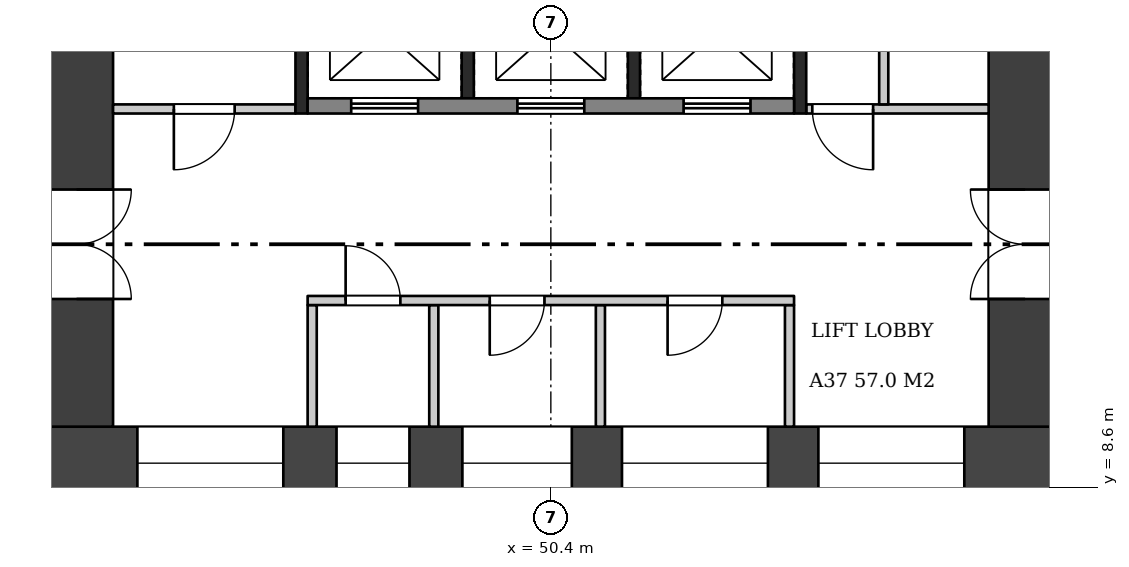
"""IFC4 building model, lengths in metres.
Left out: names, types, materials, properties, quantities, classifications, styles, units other than length and angle.
Written with IfcOpenShell. Run it as: python <this file> out.ifc"""

import sys

from ifc_helpers import new_model, si_unit, direction, frame, frame_2d, origin, place, context, subcontext, project, spatial, rectangle, extrude, element, fill, save


model = new_model("IFC4")
c1 = context("Model", 3, precision=1e-05, world=origin(), true_north=direction((0.0, 1.0)))
c2 = subcontext(c1, "Body", "Model", "MODEL_VIEW")
j1 = project(units=[si_unit("LENGTHUNIT", "METRE"), si_unit("PLANEANGLEUNIT", "RADIAN")], contexts=[c1])
p1 = place(None, origin())
s1 = spatial("IfcSite", under=j1, at=p1, CompositionType="ELEMENT")
p2 = place(p1, origin())
s2 = spatial("IfcBuilding", under=s1, at=p2, CompositionType="ELEMENT")
p3 = place(p2, frame((0.0, 0.0, 147.7)))
s3 = spatial("IfcBuildingStorey", under=s2, at=p3, CompositionType="ELEMENT", Elevation=147.7)
p4 = place(p3, frame((42.0, 9.0, 0.0), z_axis=(0.0, 0.0, 1.0), x_axis=(1.0, 0.0, 0.0)))
e1 = element("IfcWall", 1, at=p4, inside=s3, PredefinedType="SHEAR", context=c2, shape_type="SweptSolid", body=[
    extrude(rectangle(XDim=16.8, YDim=1.2, at=frame_2d((8.4, 0.0))), origin(), (0.0, 0.0, 1.0), 3.22),
])
p5 = place(p4, frame((1.6, 0.0, 0.6)))
e2 = element("IfcOpeningElement", 2, at=p5, cuts=e1, PredefinedType="OPENING", context=c2, shape_type="SweptSolid", body=[
    extrude(rectangle(XDim=2.4, YDim=2.1, at=frame_2d((1.2, 1.05))), frame((0.0, 0.61, 0.0), z_axis=(0.0, -1.0, 0.0), x_axis=(1.0, 0.0, 0.0)), (0.0, 0.0, 1.0), 1.22),
])
p6 = place(p4, frame((4.875, 0.0, 1.6)))
e3 = element("IfcOpeningElement", 3, at=p6, cuts=e1, PredefinedType="OPENING", context=c2, shape_type="SweptSolid", body=[
    extrude(rectangle(XDim=1.2, YDim=1.2, at=frame_2d((0.6, 0.6))), frame((0.0, 0.61, 0.0), z_axis=(0.0, -1.0, 0.0), x_axis=(1.0, 0.0, 0.0)), (0.0, 0.0, 1.0), 1.22),
])
p7 = place(p4, frame((6.945, 0.0, 1.6)))
e4 = element("IfcOpeningElement", 4, at=p7, cuts=e1, PredefinedType="OPENING", context=c2, shape_type="SweptSolid", body=[
    extrude(rectangle(XDim=1.8, YDim=1.2, at=frame_2d((0.9, 0.6))), frame((0.0, 0.61, 0.0), z_axis=(0.0, -1.0, 0.0), x_axis=(1.0, 0.0, 0.0)), (0.0, 0.0, 1.0), 1.22),
])
p8 = place(p4, frame((9.57, 0.0, 1.6)))
e5 = element("IfcOpeningElement", 5, at=p8, cuts=e1, PredefinedType="OPENING", context=c2, shape_type="SweptSolid", body=[
    extrude(rectangle(XDim=2.4, YDim=1.2, at=frame_2d((1.2, 0.6))), frame((0.0, 0.61, 0.0), z_axis=(0.0, -1.0, 0.0), x_axis=(1.0, 0.0, 0.0)), (0.0, 0.0, 1.0), 1.22),
])
p9 = place(p4, frame((12.8, 0.0, 0.6)))
e6 = element("IfcOpeningElement", 6, at=p9, cuts=e1, PredefinedType="OPENING", context=c2, shape_type="SweptSolid", body=[
    extrude(rectangle(XDim=2.4, YDim=2.1, at=frame_2d((1.2, 1.05))), frame((0.0, 0.61, 0.0), z_axis=(0.0, -1.0, 0.0), x_axis=(1.0, 0.0, 0.0)), (0.0, 0.0, 1.0), 1.22),
])
p10 = place(p3, frame((42.6, 9.6, 0.0), z_axis=(0.0, 0.0, 1.0), x_axis=(0.0, 1.0, 0.0)))
e7 = element("IfcWall", 7, at=p10, inside=s3, PredefinedType="SHEAR", context=c2, shape_type="SweptSolid", body=[
    extrude(rectangle(XDim=14.4, YDim=1.2, at=frame_2d((7.2, 0.0))), origin(), (0.0, 0.0, 1.0), 3.22),
])
p11 = place(p10, frame((2.1, 0.0, 0.0)))
e8 = element("IfcOpeningElement", 8, at=p11, cuts=e7, PredefinedType="OPENING", context=c2, shape_type="SweptSolid", body=[
    extrude(rectangle(XDim=1.8, YDim=2.1, at=frame_2d((0.9, 1.05))), frame((0.0, 0.61, 0.0), z_axis=(0.0, -1.0, 0.0), x_axis=(1.0, 0.0, 0.0)), (0.0, 0.0, 1.0), 1.22),
])
p12 = place(p3, frame((58.2, 9.6, 0.0), z_axis=(0.0, 0.0, 1.0), x_axis=(0.0, 1.0, 0.0)))
e9 = element("IfcWall", 9, at=p12, inside=s3, PredefinedType="SHEAR", context=c2, shape_type="SweptSolid", body=[
    extrude(rectangle(XDim=14.4, YDim=1.2, at=frame_2d((7.2, 0.0))), origin(), (0.0, 0.0, 1.0), 3.22),
])
p13 = place(p12, frame((2.1, 0.0, 0.0)))
e10 = element("IfcOpeningElement", 10, at=p13, cuts=e9, PredefinedType="OPENING", context=c2, shape_type="SweptSolid", body=[
    extrude(rectangle(XDim=1.8, YDim=2.1, at=frame_2d((0.9, 1.05))), frame((0.0, 0.61, 0.0), z_axis=(0.0, -1.0, 0.0), x_axis=(1.0, 0.0, 0.0)), (0.0, 0.0, 1.0), 1.22),
])
for number, where, z_axis, x_axis in (
    (11, (46.475, 9.6, 0.0), (0.0, 0.0, 1.0), (0.0, 1.0, 0.0)),
    (12, (54.325, 9.6, 0.0), (0.0, 0.0, 1.0), (0.0, 1.0, 0.0)),
    (13, (48.475, 9.6, 0.0), (0.0, 0.0, 1.0), (0.0, 1.0, 0.0)),
    (14, (51.215, 9.6, 0.0), (0.0, 0.0, 1.0), (0.0, 1.0, 0.0)),
):
    element("IfcWall", number, at=place(p3, frame(where, z_axis=z_axis, x_axis=x_axis)), inside=s3, PredefinedType="PARTITIONING", context=c2, shape_type="SweptSolid", body=[
        extrude(rectangle(XDim=2.0, YDim=0.15, at=frame_2d((1.0, 0.0))), origin(), (0.0, 0.0, 1.0), 3.22),
    ])
p14 = place(p3, frame((46.4, 11.675, 0.0), z_axis=(0.0, 0.0, 1.0), x_axis=(1.0, 0.0, 0.0)))
e15 = element("IfcWall", 15, at=p14, inside=s3, PredefinedType="PARTITIONING", context=c2, shape_type="SweptSolid", body=[
    extrude(rectangle(XDim=8.0, YDim=0.15, at=frame_2d((4.0, 0.0))), origin(), (0.0, 0.0, 1.0), 3.22),
])
p15 = place(p14, frame((0.625, 0.0, 0.0)))
e16 = element("IfcOpeningElement", 16, at=p15, cuts=e15, PredefinedType="OPENING", context=c2, shape_type="SweptSolid", body=[
    extrude(rectangle(XDim=0.9, YDim=2.1, at=frame_2d((0.45, 1.05))), frame((0.0, 0.085, 0.0), z_axis=(0.0, -1.0, 0.0), x_axis=(1.0, 0.0, 0.0)), (0.0, 0.0, 1.0), 0.17),
])
p16 = place(p14, frame((2.995, 0.0, 0.0)))
e17 = element("IfcOpeningElement", 17, at=p16, cuts=e15, PredefinedType="OPENING", context=c2, shape_type="SweptSolid", body=[
    extrude(rectangle(XDim=0.9, YDim=2.1, at=frame_2d((0.45, 1.05))), frame((0.0, 0.085, 0.0), z_axis=(0.0, -1.0, 0.0), x_axis=(1.0, 0.0, 0.0)), (0.0, 0.0, 1.0), 0.17),
])
p17 = place(p14, frame((5.92, 0.0, 0.0)))
e18 = element("IfcOpeningElement", 18, at=p17, cuts=e15, PredefinedType="OPENING", context=c2, shape_type="SweptSolid", body=[
    extrude(rectangle(XDim=0.9, YDim=2.1, at=frame_2d((0.45, 1.05))), frame((0.0, 0.085, 0.0), z_axis=(0.0, -1.0, 0.0), x_axis=(1.0, 0.0, 0.0)), (0.0, 0.0, 1.0), 0.17),
])
for number, where, z_axis, x_axis in (
    (19, (49.033, 15.0, 0.0), (0.0, 0.0, 1.0), (0.0, 1.0, 0.0)),
    (20, (51.767, 15.0, 0.0), (0.0, 0.0, 1.0), (0.0, 1.0, 0.0)),
):
    element("IfcWall", number, at=place(p3, frame(where, z_axis=z_axis, x_axis=x_axis)), inside=s3, PredefinedType="SHEAR", context=c2, shape_type="SweptSolid", body=[
        extrude(rectangle(XDim=1.9, YDim=0.2, at=frame_2d((0.95, 0.0))), origin(), (0.0, 0.0, 1.0), 3.22),
    ])
p18 = place(p3, frame((46.4, 14.875, 0.0), z_axis=(0.0, 0.0, 1.0), x_axis=(1.0, 0.0, 0.0)))
e21 = element("IfcWall", 21, at=p18, inside=s3, PredefinedType="SHEAR", context=c2, shape_type="SweptSolid", body=[
    extrude(rectangle(XDim=8.0, YDim=0.25, at=frame_2d((4.0, 0.0))), origin(), (0.0, 0.0, 1.0), 3.22),
])
p19 = place(p18, frame((0.717, 0.0, 0.0)))
e22 = element("IfcOpeningElement", 22, at=p19, cuts=e21, PredefinedType="OPENING", context=c2, shape_type="SweptSolid", body=[
    extrude(rectangle(XDim=1.1, YDim=2.1, at=frame_2d((0.55, 1.05))), frame((0.0, 0.135, 0.0), z_axis=(0.0, -1.0, 0.0), x_axis=(1.0, 0.0, 0.0)), (0.0, 0.0, 1.0), 0.27),
])
p20 = place(p18, frame((3.45, 0.0, 0.0)))
e23 = element("IfcOpeningElement", 23, at=p20, cuts=e21, PredefinedType="OPENING", context=c2, shape_type="SweptSolid", body=[
    extrude(rectangle(XDim=1.1, YDim=2.1, at=frame_2d((0.55, 1.05))), frame((0.0, 0.135, 0.0), z_axis=(0.0, -1.0, 0.0), x_axis=(1.0, 0.0, 0.0)), (0.0, 0.0, 1.0), 0.27),
])
p21 = place(p18, frame((6.183, 0.0, 0.0)))
e24 = element("IfcOpeningElement", 24, at=p21, cuts=e21, PredefinedType="OPENING", context=c2, shape_type="SweptSolid", body=[
    extrude(rectangle(XDim=1.1, YDim=2.1, at=frame_2d((0.55, 1.05))), frame((0.0, 0.135, 0.0), z_axis=(0.0, -1.0, 0.0), x_axis=(1.0, 0.0, 0.0)), (0.0, 0.0, 1.0), 0.27),
])
p22 = place(p3, frame((46.3, 14.75, 0.0), z_axis=(0.0, 0.0, 1.0), x_axis=(0.0, 1.0, 0.0)))
e25 = element("IfcWall", 25, at=p22, inside=s3, PredefinedType="SHEAR", context=c2, shape_type="SweptSolid", body=[
    extrude(rectangle(XDim=2.4, YDim=0.2, at=frame_2d((1.2, 0.0))), origin(), (0.0, 0.0, 1.0), 3.22),
])
p23 = place(p3, frame((43.2, 14.825, 0.0), z_axis=(0.0, 0.0, 1.0), x_axis=(1.0, 0.0, 0.0)))
e26 = element("IfcWall", 26, at=p23, inside=s3, PredefinedType="PARTITIONING", context=c2, shape_type="SweptSolid", body=[
    extrude(rectangle(XDim=3.0, YDim=0.15, at=frame_2d((1.5, 0.0))), origin(), (0.0, 0.0, 1.0), 3.22),
])
p24 = place(p23, frame((1.0, 0.0, 0.0)))
e27 = element("IfcOpeningElement", 27, at=p24, cuts=e26, PredefinedType="OPENING", context=c2, shape_type="SweptSolid", body=[
    extrude(rectangle(XDim=1.0, YDim=2.1, at=frame_2d((0.5, 1.05))), frame((0.0, 0.085, 0.0), z_axis=(0.0, -1.0, 0.0), x_axis=(1.0, 0.0, 0.0)), (0.0, 0.0, 1.0), 0.17),
])
p25 = place(p3, frame((54.5, 14.75, 0.0), z_axis=(0.0, 0.0, 1.0), x_axis=(0.0, 1.0, 0.0)))
e28 = element("IfcWall", 28, at=p25, inside=s3, PredefinedType="SHEAR", context=c2, shape_type="SweptSolid", body=[
    extrude(rectangle(XDim=9.25, YDim=0.2, at=frame_2d((4.625, 0.0))), origin(), (0.0, 0.0, 1.0), 3.22),
])
p26 = place(p3, frame((54.6, 14.825, 0.0), z_axis=(0.0, 0.0, 1.0), x_axis=(1.0, 0.0, 0.0)))
e29 = element("IfcWall", 29, at=p26, inside=s3, PredefinedType="PARTITIONING", context=c2, shape_type="SweptSolid", body=[
    extrude(rectangle(XDim=3.0, YDim=0.15, at=frame_2d((1.5, 0.0))), origin(), (0.0, 0.0, 1.0), 3.22),
])
p27 = place(p26, frame((0.1, 0.0, 0.0)))
e30 = element("IfcOpeningElement", 30, at=p27, cuts=e29, PredefinedType="OPENING", context=c2, shape_type="SweptSolid", body=[
    extrude(rectangle(XDim=1.0, YDim=2.1, at=frame_2d((0.5, 1.05))), frame((0.0, 0.085, 0.0), z_axis=(0.0, -1.0, 0.0), x_axis=(1.0, 0.0, 0.0)), (0.0, 0.0, 1.0), 0.17),
])
p28 = place(p3, frame((55.875, 14.9, 0.0), z_axis=(0.0, 0.0, 1.0), x_axis=(0.0, 1.0, 0.0)))
e31 = element("IfcWall", 31, at=p28, inside=s3, PredefinedType="PARTITIONING", context=c2, shape_type="SweptSolid", body=[
    extrude(rectangle(XDim=9.1, YDim=0.15, at=frame_2d((4.55, 0.0))), origin(), (0.0, 0.0, 1.0), 3.22),
])
p29 = place(p28, frame((1.26, 0.0, 0.0)))
e32 = element("IfcOpeningElement", 32, at=p29, cuts=e31, PredefinedType="OPENING", context=c2, shape_type="SweptSolid", body=[
    extrude(rectangle(XDim=1.0, YDim=2.1, at=frame_2d((0.5, 1.05))), frame((0.0, 0.085, 0.0), z_axis=(0.0, -1.0, 0.0), x_axis=(1.0, 0.0, 0.0)), (0.0, 0.0, 1.0), 0.17),
])
p30 = place(p28, frame((4.54, 0.0, 0.0)))
e33 = element("IfcOpeningElement", 33, at=p30, cuts=e31, PredefinedType="OPENING", context=c2, shape_type="SweptSolid", body=[
    extrude(rectangle(XDim=0.9, YDim=2.1, at=frame_2d((0.45, 1.05))), frame((0.0, 0.085, 0.0), z_axis=(0.0, -1.0, 0.0), x_axis=(1.0, 0.0, 0.0)), (0.0, 0.0, 1.0), 0.17),
])
p31 = place(p28, frame((7.33, 0.0, 0.0)))
e34 = element("IfcOpeningElement", 34, at=p31, cuts=e31, PredefinedType="OPENING", context=c2, shape_type="SweptSolid", body=[
    extrude(rectangle(XDim=0.9, YDim=2.1, at=frame_2d((0.45, 1.05))), frame((0.0, 0.085, 0.0), z_axis=(0.0, -1.0, 0.0), x_axis=(1.0, 0.0, 0.0)), (0.0, 0.0, 1.0), 0.17),
])
p32 = place(p11, frame((1.8, 0.0, 0.0), z_axis=(0.0, 0.0, 1.0), x_axis=(-1.0, 0.0, 0.0)))
e35 = element("IfcDoor", 35, at=p32, inside=s3, OperationType="DOUBLE_DOOR_SINGLE_SWING", PredefinedType="DOOR", context=c2, shape_type="SweptSolid", body=[
    extrude(rectangle(XDim=1.8, YDim=2.1, at=frame_2d((0.9, 1.05))), frame((0.0, 0.025, 0.0), z_axis=(0.0, -1.0, 0.0), x_axis=(1.0, 0.0, 0.0)), (0.0, 0.0, 1.0), 0.05),
])
fill(e8, e35)
p33 = place(p13, origin())
e36 = element("IfcDoor", 36, at=p33, inside=s3, OperationType="DOUBLE_DOOR_SINGLE_SWING", PredefinedType="DOOR", context=c2, shape_type="SweptSolid", body=[
    extrude(rectangle(XDim=1.8, YDim=2.1, at=frame_2d((0.9, 1.05))), frame((0.0, 0.025, 0.0), z_axis=(0.0, -1.0, 0.0), x_axis=(1.0, 0.0, 0.0)), (0.0, 0.0, 1.0), 0.05),
])
fill(e10, e36)
p34 = place(p15, origin())
e37 = element("IfcDoor", 37, at=p34, inside=s3, OperationType="SINGLE_SWING_LEFT", PredefinedType="DOOR", context=c2, shape_type="SweptSolid", body=[
    extrude(rectangle(XDim=0.9, YDim=2.1, at=frame_2d((0.45, 1.05))), frame((0.0, 0.025, 0.0), z_axis=(0.0, -1.0, 0.0), x_axis=(1.0, 0.0, 0.0)), (0.0, 0.0, 1.0), 0.05),
])
fill(e16, e37)
p35 = place(p16, frame((0.9, 0.0, 0.0), z_axis=(0.0, 0.0, 1.0), x_axis=(-1.0, 0.0, 0.0)))
e38 = element("IfcDoor", 38, at=p35, inside=s3, OperationType="SINGLE_SWING_RIGHT", PredefinedType="DOOR", context=c2, shape_type="SweptSolid", body=[
    extrude(rectangle(XDim=0.9, YDim=2.1, at=frame_2d((0.45, 1.05))), frame((0.0, 0.025, 0.0), z_axis=(0.0, -1.0, 0.0), x_axis=(1.0, 0.0, 0.0)), (0.0, 0.0, 1.0), 0.05),
])
fill(e17, e38)
p36 = place(p17, frame((0.9, 0.0, 0.0), z_axis=(0.0, 0.0, 1.0), x_axis=(-1.0, 0.0, 0.0)))
e39 = element("IfcDoor", 39, at=p36, inside=s3, OperationType="SINGLE_SWING_RIGHT", PredefinedType="DOOR", context=c2, shape_type="SweptSolid", body=[
    extrude(rectangle(XDim=0.9, YDim=2.1, at=frame_2d((0.45, 1.05))), frame((0.0, 0.025, 0.0), z_axis=(0.0, -1.0, 0.0), x_axis=(1.0, 0.0, 0.0)), (0.0, 0.0, 1.0), 0.05),
])
fill(e18, e39)
p37 = place(p19, origin())
e40 = element("IfcDoor", 40, at=p37, inside=s3, OperationType="DOUBLE_DOOR_SLIDING", PredefinedType="DOOR", context=c2, shape_type="SweptSolid", body=[
    extrude(rectangle(XDim=1.1, YDim=2.1, at=frame_2d((0.55, 1.05))), frame((0.0, 0.025, 0.0), z_axis=(0.0, -1.0, 0.0), x_axis=(1.0, 0.0, 0.0)), (0.0, 0.0, 1.0), 0.05),
])
fill(e22, e40)
p38 = place(p20, origin())
e41 = element("IfcDoor", 41, at=p38, inside=s3, OperationType="DOUBLE_DOOR_SLIDING", PredefinedType="DOOR", context=c2, shape_type="SweptSolid", body=[
    extrude(rectangle(XDim=1.1, YDim=2.1, at=frame_2d((0.55, 1.05))), frame((0.0, 0.025, 0.0), z_axis=(0.0, -1.0, 0.0), x_axis=(1.0, 0.0, 0.0)), (0.0, 0.0, 1.0), 0.05),
])
fill(e23, e41)
p39 = place(p21, origin())
e42 = element("IfcDoor", 42, at=p39, inside=s3, OperationType="DOUBLE_DOOR_SLIDING", PredefinedType="DOOR", context=c2, shape_type="SweptSolid", body=[
    extrude(rectangle(XDim=1.1, YDim=2.1, at=frame_2d((0.55, 1.05))), frame((0.0, 0.025, 0.0), z_axis=(0.0, -1.0, 0.0), x_axis=(1.0, 0.0, 0.0)), (0.0, 0.0, 1.0), 0.05),
])
fill(e24, e42)
p40 = place(p24, frame((1.0, 0.0, 0.0), z_axis=(0.0, 0.0, 1.0), x_axis=(-1.0, 0.0, 0.0)))
e43 = element("IfcDoor", 43, at=p40, inside=s3, OperationType="SINGLE_SWING_RIGHT", PredefinedType="DOOR", context=c2, shape_type="SweptSolid", body=[
    extrude(rectangle(XDim=1.0, YDim=2.1, at=frame_2d((0.5, 1.05))), frame((0.0, 0.025, 0.0), z_axis=(0.0, -1.0, 0.0), x_axis=(1.0, 0.0, 0.0)), (0.0, 0.0, 1.0), 0.05),
])
fill(e27, e43)
p41 = place(p27, frame((1.0, 0.0, 0.0), z_axis=(0.0, 0.0, 1.0), x_axis=(-1.0, 0.0, 0.0)))
e44 = element("IfcDoor", 44, at=p41, inside=s3, OperationType="SINGLE_SWING_LEFT", PredefinedType="DOOR", context=c2, shape_type="SweptSolid", body=[
    extrude(rectangle(XDim=1.0, YDim=2.1, at=frame_2d((0.5, 1.05))), frame((0.0, 0.025, 0.0), z_axis=(0.0, -1.0, 0.0), x_axis=(1.0, 0.0, 0.0)), (0.0, 0.0, 1.0), 0.05),
])
fill(e30, e44)
p42 = place(p5, origin())
e45 = element("IfcWindow", 45, at=p42, inside=s3, PartitioningType="SINGLE_PANEL", PredefinedType="WINDOW", context=c2, shape_type="SweptSolid", body=[
    extrude(rectangle(XDim=2.4, YDim=2.1, at=frame_2d((1.2, 1.05))), frame((0.0, 0.03, 0.0), z_axis=(0.0, -1.0, 0.0), x_axis=(1.0, 0.0, 0.0)), (0.0, 0.0, 1.0), 0.06),
])
fill(e2, e45)
p43 = place(p6, origin())
e46 = element("IfcWindow", 46, at=p43, inside=s3, PartitioningType="SINGLE_PANEL", PredefinedType="WINDOW", context=c2, shape_type="SweptSolid", body=[
    extrude(rectangle(XDim=1.2, YDim=1.2, at=frame_2d((0.6, 0.6))), frame((0.0, 0.03, 0.0), z_axis=(0.0, -1.0, 0.0), x_axis=(1.0, 0.0, 0.0)), (0.0, 0.0, 1.0), 0.06),
])
fill(e3, e46)
p44 = place(p7, origin())
e47 = element("IfcWindow", 47, at=p44, inside=s3, PartitioningType="SINGLE_PANEL", PredefinedType="WINDOW", context=c2, shape_type="SweptSolid", body=[
    extrude(rectangle(XDim=1.8, YDim=1.2, at=frame_2d((0.9, 0.6))), frame((0.0, 0.03, 0.0), z_axis=(0.0, -1.0, 0.0), x_axis=(1.0, 0.0, 0.0)), (0.0, 0.0, 1.0), 0.06),
])
fill(e4, e47)
p45 = place(p8, origin())
e48 = element("IfcWindow", 48, at=p45, inside=s3, PartitioningType="SINGLE_PANEL", PredefinedType="WINDOW", context=c2, shape_type="SweptSolid", body=[
    extrude(rectangle(XDim=2.4, YDim=1.2, at=frame_2d((1.2, 0.6))), frame((0.0, 0.03, 0.0), z_axis=(0.0, -1.0, 0.0), x_axis=(1.0, 0.0, 0.0)), (0.0, 0.0, 1.0), 0.06),
])
fill(e5, e48)
p46 = place(p9, origin())
e49 = element("IfcWindow", 49, at=p46, inside=s3, PartitioningType="SINGLE_PANEL", PredefinedType="WINDOW", context=c2, shape_type="SweptSolid", body=[
    extrude(rectangle(XDim=2.4, YDim=2.1, at=frame_2d((1.2, 1.05))), frame((0.0, 0.03, 0.0), z_axis=(0.0, -1.0, 0.0), x_axis=(1.0, 0.0, 0.0)), (0.0, 0.0, 1.0), 0.06),
])
fill(e6, e49)
save(model, sys.argv[1])
